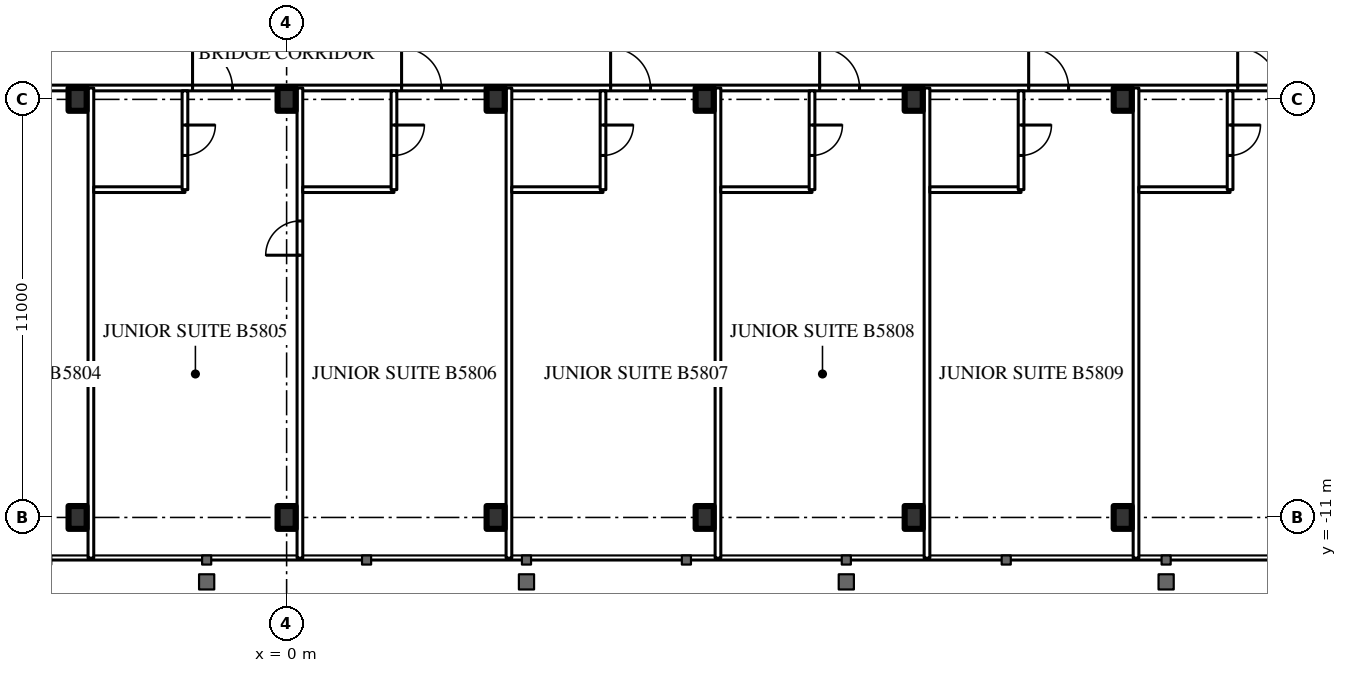
"""IFC4 building model, lengths in metres.
Left out: names, types, materials, properties, quantities, classifications, styles, units other than length and angle.
Written with IfcOpenShell. Run it as: python <this file> out.ifc"""

import sys

from ifc_helpers import new_model, si_unit, direction, frame, frame_2d, origin, origin_2d, place, context, subcontext, project, spatial, rectangle, i_section, extrude, element, fill, save


model = new_model("IFC4")
c1 = context("Model", 3, precision=1e-05, world=origin(), true_north=direction((0.0, 1.0)))
c2 = subcontext(c1, "Body", "Model", "MODEL_VIEW")
j1 = project(units=[si_unit("LENGTHUNIT", "METRE"), si_unit("PLANEANGLEUNIT", "RADIAN")], contexts=[c1])
p1 = place(None, origin())
s1 = spatial("IfcSite", under=j1, at=p1, CompositionType="ELEMENT")
p2 = place(p1, origin())
s2 = spatial("IfcBuilding", under=s1, at=p2, CompositionType="ELEMENT")
p3 = place(p2, frame((0.0, 0.0, 218.9)))
s3 = spatial("IfcBuildingStorey", under=s2, at=p3, CompositionType="ELEMENT", Elevation=218.9)
for number, where, z_axis, x_axis in (
    (1, (-5.5, -11.0, 0.0), (0.0, 0.0, 1.0), (1.0, 0.0, 0.0)),
    (2, (0.0, -11.0, 0.0), (0.0, 0.0, 1.0), (1.0, 0.0, 0.0)),
    (3, (5.5, -11.0, 0.0), (0.0, 0.0, 1.0), (1.0, 0.0, 0.0)),
    (4, (11.0, -11.0, 0.0), (0.0, 0.0, 1.0), (1.0, 0.0, 0.0)),
    (5, (16.5, -11.0, 0.0), (0.0, 0.0, 1.0), (1.0, 0.0, 0.0)),
    (6, (22.0, -11.0, 0.0), (0.0, 0.0, 1.0), (1.0, 0.0, 0.0)),
    (7, (-5.5, 0.0, 0.0), (0.0, 0.0, 1.0), (1.0, 0.0, 0.0)),
    (8, (0.0, 0.0, 0.0), (0.0, 0.0, 1.0), (1.0, 0.0, 0.0)),
    (9, (5.5, 0.0, 0.0), (0.0, 0.0, 1.0), (1.0, 0.0, 0.0)),
    (10, (11.0, 0.0, 0.0), (0.0, 0.0, 1.0), (1.0, 0.0, 0.0)),
    (11, (16.5, 0.0, 0.0), (0.0, 0.0, 1.0), (1.0, 0.0, 0.0)),
    (12, (22.0, 0.0, 0.0), (0.0, 0.0, 1.0), (1.0, 0.0, 0.0)),
):
    element("IfcColumn", number, at=place(p3, frame(where, z_axis=z_axis, x_axis=x_axis)), inside=s3, PredefinedType="COLUMN", context=c2, shape_type="SweptSolid", body=[
        extrude(i_section(OverallWidth=0.476, OverallDepth=0.6, WebThickness=0.1, FlangeThickness=0.14, FilletRadius=0.02, at=origin_2d()), origin(), (0.0, 0.0, 1.0), 3.6),
    ])
p4 = place(p3, frame((-27.5, 0.3, 0.0), z_axis=(0.0, 0.0, 1.0), x_axis=(1.0, 0.0, 0.0)))
e13 = element("IfcWall", 13, at=p4, inside=s3, PredefinedType="PARTITIONING", context=c2, shape_type="SweptSolid", body=[
    extrude(rectangle(XDim=55.0, YDim=0.15, at=frame_2d((27.5, 0.0))), origin(), (0.0, 0.0, 1.0), 2.4),
])
p5 = place(p4, frame((1.575, 0.0, 0.0)))
e14 = element("IfcOpeningElement", 14, at=p5, cuts=e13, PredefinedType="OPENING", context=c2, shape_type="SweptSolid", body=[
    extrude(rectangle(XDim=1.0, YDim=2.2, at=frame_2d((0.5, 1.1))), frame((0.0, 0.085, 0.0), z_axis=(0.0, -1.0, 0.0), x_axis=(1.0, 0.0, 0.0)), (0.0, 0.0, 1.0), 0.17),
])
p6 = place(p4, frame((8.525, 0.0, 0.0)))
e15 = element("IfcOpeningElement", 15, at=p6, cuts=e13, PredefinedType="OPENING", context=c2, shape_type="SweptSolid", body=[
    extrude(rectangle(XDim=1.05, YDim=2.4, at=frame_2d((0.525, 1.2))), frame((0.0, 0.085, 0.0), z_axis=(0.0, -1.0, 0.0), x_axis=(1.0, 0.0, 0.0)), (0.0, 0.0, 1.0), 0.17),
])
p7 = place(p4, frame((14.025, 0.0, 0.0)))
e16 = element("IfcOpeningElement", 16, at=p7, cuts=e13, PredefinedType="OPENING", context=c2, shape_type="SweptSolid", body=[
    extrude(rectangle(XDim=1.05, YDim=2.4, at=frame_2d((0.525, 1.2))), frame((0.0, 0.085, 0.0), z_axis=(0.0, -1.0, 0.0), x_axis=(1.0, 0.0, 0.0)), (0.0, 0.0, 1.0), 0.17),
])
p8 = place(p4, frame((19.525, 0.0, 0.0)))
e17 = element("IfcOpeningElement", 17, at=p8, cuts=e13, PredefinedType="OPENING", context=c2, shape_type="SweptSolid", body=[
    extrude(rectangle(XDim=1.05, YDim=2.4, at=frame_2d((0.525, 1.2))), frame((0.0, 0.085, 0.0), z_axis=(0.0, -1.0, 0.0), x_axis=(1.0, 0.0, 0.0)), (0.0, 0.0, 1.0), 0.17),
])
p9 = place(p4, frame((25.025, 0.0, 0.0)))
e18 = element("IfcOpeningElement", 18, at=p9, cuts=e13, PredefinedType="OPENING", context=c2, shape_type="SweptSolid", body=[
    extrude(rectangle(XDim=1.05, YDim=2.4, at=frame_2d((0.525, 1.2))), frame((0.0, 0.085, 0.0), z_axis=(0.0, -1.0, 0.0), x_axis=(1.0, 0.0, 0.0)), (0.0, 0.0, 1.0), 0.17),
])
p10 = place(p4, frame((30.525, 0.0, 0.0)))
e19 = element("IfcOpeningElement", 19, at=p10, cuts=e13, PredefinedType="OPENING", context=c2, shape_type="SweptSolid", body=[
    extrude(rectangle(XDim=1.05, YDim=2.4, at=frame_2d((0.525, 1.2))), frame((0.0, 0.085, 0.0), z_axis=(0.0, -1.0, 0.0), x_axis=(1.0, 0.0, 0.0)), (0.0, 0.0, 1.0), 0.17),
])
p11 = place(p4, frame((36.025, 0.0, 0.0)))
e20 = element("IfcOpeningElement", 20, at=p11, cuts=e13, PredefinedType="OPENING", context=c2, shape_type="SweptSolid", body=[
    extrude(rectangle(XDim=1.05, YDim=2.4, at=frame_2d((0.525, 1.2))), frame((0.0, 0.085, 0.0), z_axis=(0.0, -1.0, 0.0), x_axis=(1.0, 0.0, 0.0)), (0.0, 0.0, 1.0), 0.17),
])
p12 = place(p4, frame((41.525, 0.0, 0.0)))
e21 = element("IfcOpeningElement", 21, at=p12, cuts=e13, PredefinedType="OPENING", context=c2, shape_type="SweptSolid", body=[
    extrude(rectangle(XDim=1.05, YDim=2.4, at=frame_2d((0.525, 1.2))), frame((0.0, 0.085, 0.0), z_axis=(0.0, -1.0, 0.0), x_axis=(1.0, 0.0, 0.0)), (0.0, 0.0, 1.0), 0.17),
])
p13 = place(p4, frame((47.025, 0.0, 0.0)))
e22 = element("IfcOpeningElement", 22, at=p13, cuts=e13, PredefinedType="OPENING", context=c2, shape_type="SweptSolid", body=[
    extrude(rectangle(XDim=1.05, YDim=2.4, at=frame_2d((0.525, 1.2))), frame((0.0, 0.085, 0.0), z_axis=(0.0, -1.0, 0.0), x_axis=(1.0, 0.0, 0.0)), (0.0, 0.0, 1.0), 0.17),
])
p14 = place(p4, frame((52.525, 0.0, 0.0)))
e23 = element("IfcOpeningElement", 23, at=p14, cuts=e13, PredefinedType="OPENING", context=c2, shape_type="SweptSolid", body=[
    extrude(rectangle(XDim=1.05, YDim=2.4, at=frame_2d((0.525, 1.2))), frame((0.0, 0.085, 0.0), z_axis=(0.0, -1.0, 0.0), x_axis=(1.0, 0.0, 0.0)), (0.0, 0.0, 1.0), 0.17),
])
p15 = place(p3, frame((-5.15, -12.07, 0.0), z_axis=(0.0, 0.0, 1.0), x_axis=(0.0, 1.0, 0.0)))
e24 = element("IfcWall", 24, at=p15, inside=s3, PredefinedType="PARTITIONING", context=c2, shape_type="SweptSolid", body=[
    extrude(rectangle(XDim=12.37, YDim=0.15, at=frame_2d((6.185, 0.0))), origin(), (0.0, 0.0, 1.0), 3.4),
])
p16 = place(p3, frame((0.35, -12.07, 0.0), z_axis=(0.0, 0.0, 1.0), x_axis=(0.0, 1.0, 0.0)))
e25 = element("IfcWall", 25, at=p16, inside=s3, PredefinedType="PARTITIONING", context=c2, shape_type="SweptSolid", body=[
    extrude(rectangle(XDim=12.37, YDim=0.15, at=frame_2d((6.185, 0.0))), origin(), (0.0, 0.0, 1.0), 3.4),
])
p17 = place(p16, frame((7.97, 0.0, 0.0)))
e26 = element("IfcOpeningElement", 26, at=p17, cuts=e25, PredefinedType="OPENING", context=c2, shape_type="SweptSolid", body=[
    extrude(rectangle(XDim=0.9, YDim=2.2, at=frame_2d((0.45, 1.1))), frame((0.0, 0.085, 0.0), z_axis=(0.0, -1.0, 0.0), x_axis=(1.0, 0.0, 0.0)), (0.0, 0.0, 1.0), 0.17),
])
for number, where, z_axis, x_axis in (
    (27, (5.85, -12.07, 0.0), (0.0, 0.0, 1.0), (0.0, 1.0, 0.0)),
    (28, (11.35, -12.07, 0.0), (0.0, 0.0, 1.0), (0.0, 1.0, 0.0)),
    (29, (16.85, -12.07, 0.0), (0.0, 0.0, 1.0), (0.0, 1.0, 0.0)),
    (30, (22.35, -12.07, 0.0), (0.0, 0.0, 1.0), (0.0, 1.0, 0.0)),
):
    element("IfcWall", number, at=place(p3, frame(where, z_axis=z_axis, x_axis=x_axis)), inside=s3, PredefinedType="PARTITIONING", context=c2, shape_type="SweptSolid", body=[
        extrude(rectangle(XDim=12.37, YDim=0.15, at=frame_2d((6.185, 0.0))), origin(), (0.0, 0.0, 1.0), 3.4),
    ])
p18 = place(p3, frame((-5.075, -2.375, 0.0), z_axis=(0.0, 0.0, 1.0), x_axis=(1.0, 0.0, 0.0)))
e31 = element("IfcWall", 31, at=p18, inside=s3, PredefinedType="PARTITIONING", context=c2, shape_type="SweptSolid", body=[
    extrude(rectangle(XDim=2.4, YDim=0.15, at=frame_2d((1.2, 0.0))), origin(), (0.0, 0.0, 1.0), 3.4),
])
p19 = place(p3, frame((-2.675, -2.375, 0.0), z_axis=(0.0, 0.0, 1.0), x_axis=(0.0, 1.0, 0.0)))
e32 = element("IfcWall", 32, at=p19, inside=s3, PredefinedType="PARTITIONING", context=c2, shape_type="SweptSolid", body=[
    extrude(rectangle(XDim=2.6, YDim=0.15, at=frame_2d((1.3, 0.0))), origin(), (0.0, 0.0, 1.0), 3.4),
])
p20 = place(p19, frame((0.9, 0.0, 0.0)))
e33 = element("IfcOpeningElement", 33, at=p20, cuts=e32, PredefinedType="OPENING", context=c2, shape_type="SweptSolid", body=[
    extrude(rectangle(XDim=0.8, YDim=2.2, at=frame_2d((0.4, 1.1))), frame((0.0, 0.085, 0.0), z_axis=(0.0, -1.0, 0.0), x_axis=(1.0, 0.0, 0.0)), (0.0, 0.0, 1.0), 0.17),
])
p21 = place(p3, frame((0.425, -2.375, 0.0), z_axis=(0.0, 0.0, 1.0), x_axis=(1.0, 0.0, 0.0)))
e34 = element("IfcWall", 34, at=p21, inside=s3, PredefinedType="PARTITIONING", context=c2, shape_type="SweptSolid", body=[
    extrude(rectangle(XDim=2.4, YDim=0.15, at=frame_2d((1.2, 0.0))), origin(), (0.0, 0.0, 1.0), 3.4),
])
p22 = place(p3, frame((2.825, -2.375, 0.0), z_axis=(0.0, 0.0, 1.0), x_axis=(0.0, 1.0, 0.0)))
e35 = element("IfcWall", 35, at=p22, inside=s3, PredefinedType="PARTITIONING", context=c2, shape_type="SweptSolid", body=[
    extrude(rectangle(XDim=2.6, YDim=0.15, at=frame_2d((1.3, 0.0))), origin(), (0.0, 0.0, 1.0), 3.4),
])
p23 = place(p22, frame((0.9, 0.0, 0.0)))
e36 = element("IfcOpeningElement", 36, at=p23, cuts=e35, PredefinedType="OPENING", context=c2, shape_type="SweptSolid", body=[
    extrude(rectangle(XDim=0.8, YDim=2.2, at=frame_2d((0.4, 1.1))), frame((0.0, 0.085, 0.0), z_axis=(0.0, -1.0, 0.0), x_axis=(1.0, 0.0, 0.0)), (0.0, 0.0, 1.0), 0.17),
])
p24 = place(p3, frame((5.925, -2.375, 0.0), z_axis=(0.0, 0.0, 1.0), x_axis=(1.0, 0.0, 0.0)))
e37 = element("IfcWall", 37, at=p24, inside=s3, PredefinedType="PARTITIONING", context=c2, shape_type="SweptSolid", body=[
    extrude(rectangle(XDim=2.4, YDim=0.15, at=frame_2d((1.2, 0.0))), origin(), (0.0, 0.0, 1.0), 3.4),
])
p25 = place(p3, frame((8.325, -2.375, 0.0), z_axis=(0.0, 0.0, 1.0), x_axis=(0.0, 1.0, 0.0)))
e38 = element("IfcWall", 38, at=p25, inside=s3, PredefinedType="PARTITIONING", context=c2, shape_type="SweptSolid", body=[
    extrude(rectangle(XDim=2.6, YDim=0.15, at=frame_2d((1.3, 0.0))), origin(), (0.0, 0.0, 1.0), 3.4),
])
p26 = place(p25, frame((0.9, 0.0, 0.0)))
e39 = element("IfcOpeningElement", 39, at=p26, cuts=e38, PredefinedType="OPENING", context=c2, shape_type="SweptSolid", body=[
    extrude(rectangle(XDim=0.8, YDim=2.2, at=frame_2d((0.4, 1.1))), frame((0.0, 0.085, 0.0), z_axis=(0.0, -1.0, 0.0), x_axis=(1.0, 0.0, 0.0)), (0.0, 0.0, 1.0), 0.17),
])
p27 = place(p3, frame((11.425, -2.375, 0.0), z_axis=(0.0, 0.0, 1.0), x_axis=(1.0, 0.0, 0.0)))
e40 = element("IfcWall", 40, at=p27, inside=s3, PredefinedType="PARTITIONING", context=c2, shape_type="SweptSolid", body=[
    extrude(rectangle(XDim=2.4, YDim=0.15, at=frame_2d((1.2, 0.0))), origin(), (0.0, 0.0, 1.0), 3.4),
])
p28 = place(p3, frame((13.825, -2.375, 0.0), z_axis=(0.0, 0.0, 1.0), x_axis=(0.0, 1.0, 0.0)))
e41 = element("IfcWall", 41, at=p28, inside=s3, PredefinedType="PARTITIONING", context=c2, shape_type="SweptSolid", body=[
    extrude(rectangle(XDim=2.6, YDim=0.15, at=frame_2d((1.3, 0.0))), origin(), (0.0, 0.0, 1.0), 3.4),
])
p29 = place(p28, frame((0.9, 0.0, 0.0)))
e42 = element("IfcOpeningElement", 42, at=p29, cuts=e41, PredefinedType="OPENING", context=c2, shape_type="SweptSolid", body=[
    extrude(rectangle(XDim=0.8, YDim=2.2, at=frame_2d((0.4, 1.1))), frame((0.0, 0.085, 0.0), z_axis=(0.0, -1.0, 0.0), x_axis=(1.0, 0.0, 0.0)), (0.0, 0.0, 1.0), 0.17),
])
p30 = place(p3, frame((16.925, -2.375, 0.0), z_axis=(0.0, 0.0, 1.0), x_axis=(1.0, 0.0, 0.0)))
e43 = element("IfcWall", 43, at=p30, inside=s3, PredefinedType="PARTITIONING", context=c2, shape_type="SweptSolid", body=[
    extrude(rectangle(XDim=2.4, YDim=0.15, at=frame_2d((1.2, 0.0))), origin(), (0.0, 0.0, 1.0), 3.4),
])
p31 = place(p3, frame((19.325, -2.375, 0.0), z_axis=(0.0, 0.0, 1.0), x_axis=(0.0, 1.0, 0.0)))
e44 = element("IfcWall", 44, at=p31, inside=s3, PredefinedType="PARTITIONING", context=c2, shape_type="SweptSolid", body=[
    extrude(rectangle(XDim=2.6, YDim=0.15, at=frame_2d((1.3, 0.0))), origin(), (0.0, 0.0, 1.0), 3.4),
])
p32 = place(p31, frame((0.9, 0.0, 0.0)))
e45 = element("IfcOpeningElement", 45, at=p32, cuts=e44, PredefinedType="OPENING", context=c2, shape_type="SweptSolid", body=[
    extrude(rectangle(XDim=0.8, YDim=2.2, at=frame_2d((0.4, 1.1))), frame((0.0, 0.085, 0.0), z_axis=(0.0, -1.0, 0.0), x_axis=(1.0, 0.0, 0.0)), (0.0, 0.0, 1.0), 0.17),
])
p33 = place(p3, frame((22.425, -2.375, 0.0), z_axis=(0.0, 0.0, 1.0), x_axis=(1.0, 0.0, 0.0)))
e46 = element("IfcWall", 46, at=p33, inside=s3, PredefinedType="PARTITIONING", context=c2, shape_type="SweptSolid", body=[
    extrude(rectangle(XDim=2.4, YDim=0.15, at=frame_2d((1.2, 0.0))), origin(), (0.0, 0.0, 1.0), 3.4),
])
p34 = place(p3, frame((24.825, -2.375, 0.0), z_axis=(0.0, 0.0, 1.0), x_axis=(0.0, 1.0, 0.0)))
e47 = element("IfcWall", 47, at=p34, inside=s3, PredefinedType="PARTITIONING", context=c2, shape_type="SweptSolid", body=[
    extrude(rectangle(XDim=2.6, YDim=0.15, at=frame_2d((1.3, 0.0))), origin(), (0.0, 0.0, 1.0), 3.4),
])
p35 = place(p34, frame((0.9, 0.0, 0.0)))
e48 = element("IfcOpeningElement", 48, at=p35, cuts=e47, PredefinedType="OPENING", context=c2, shape_type="SweptSolid", body=[
    extrude(rectangle(XDim=0.8, YDim=2.2, at=frame_2d((0.4, 1.1))), frame((0.0, 0.085, 0.0), z_axis=(0.0, -1.0, 0.0), x_axis=(1.0, 0.0, 0.0)), (0.0, 0.0, 1.0), 0.17),
])
p36 = place(p20, origin())
e49 = element("IfcDoor", 49, at=p36, inside=s3, OperationType="SINGLE_SWING_RIGHT", PredefinedType="DOOR", context=c2, shape_type="SweptSolid", body=[
    extrude(rectangle(XDim=0.8, YDim=2.2, at=frame_2d((0.4, 1.1))), frame((0.0, 0.025, 0.0), z_axis=(0.0, -1.0, 0.0), x_axis=(1.0, 0.0, 0.0)), (0.0, 0.0, 1.0), 0.05),
])
fill(e33, e49)
p37 = place(p9, origin())
e50 = element("IfcDoor", 50, at=p37, inside=s3, OperationType="SINGLE_SWING_LEFT", PredefinedType="DOOR", context=c2, shape_type="SweptSolid", body=[
    extrude(rectangle(XDim=1.05, YDim=2.4, at=frame_2d((0.525, 1.2))), frame((0.0, 0.025, 0.0), z_axis=(0.0, -1.0, 0.0), x_axis=(1.0, 0.0, 0.0)), (0.0, 0.0, 1.0), 0.05),
])
fill(e18, e50)
p38 = place(p23, origin())
e51 = element("IfcDoor", 51, at=p38, inside=s3, OperationType="SINGLE_SWING_RIGHT", PredefinedType="DOOR", context=c2, shape_type="SweptSolid", body=[
    extrude(rectangle(XDim=0.8, YDim=2.2, at=frame_2d((0.4, 1.1))), frame((0.0, 0.025, 0.0), z_axis=(0.0, -1.0, 0.0), x_axis=(1.0, 0.0, 0.0)), (0.0, 0.0, 1.0), 0.05),
])
fill(e36, e51)
p39 = place(p10, origin())
e52 = element("IfcDoor", 52, at=p39, inside=s3, OperationType="SINGLE_SWING_LEFT", PredefinedType="DOOR", context=c2, shape_type="SweptSolid", body=[
    extrude(rectangle(XDim=1.05, YDim=2.4, at=frame_2d((0.525, 1.2))), frame((0.0, 0.025, 0.0), z_axis=(0.0, -1.0, 0.0), x_axis=(1.0, 0.0, 0.0)), (0.0, 0.0, 1.0), 0.05),
])
fill(e19, e52)
p40 = place(p26, origin())
e53 = element("IfcDoor", 53, at=p40, inside=s3, OperationType="SINGLE_SWING_RIGHT", PredefinedType="DOOR", context=c2, shape_type="SweptSolid", body=[
    extrude(rectangle(XDim=0.8, YDim=2.2, at=frame_2d((0.4, 1.1))), frame((0.0, 0.025, 0.0), z_axis=(0.0, -1.0, 0.0), x_axis=(1.0, 0.0, 0.0)), (0.0, 0.0, 1.0), 0.05),
])
fill(e39, e53)
p41 = place(p11, origin())
e54 = element("IfcDoor", 54, at=p41, inside=s3, OperationType="SINGLE_SWING_LEFT", PredefinedType="DOOR", context=c2, shape_type="SweptSolid", body=[
    extrude(rectangle(XDim=1.05, YDim=2.4, at=frame_2d((0.525, 1.2))), frame((0.0, 0.025, 0.0), z_axis=(0.0, -1.0, 0.0), x_axis=(1.0, 0.0, 0.0)), (0.0, 0.0, 1.0), 0.05),
])
fill(e20, e54)
p42 = place(p29, origin())
e55 = element("IfcDoor", 55, at=p42, inside=s3, OperationType="SINGLE_SWING_RIGHT", PredefinedType="DOOR", context=c2, shape_type="SweptSolid", body=[
    extrude(rectangle(XDim=0.8, YDim=2.2, at=frame_2d((0.4, 1.1))), frame((0.0, 0.025, 0.0), z_axis=(0.0, -1.0, 0.0), x_axis=(1.0, 0.0, 0.0)), (0.0, 0.0, 1.0), 0.05),
])
fill(e42, e55)
p43 = place(p12, origin())
e56 = element("IfcDoor", 56, at=p43, inside=s3, OperationType="SINGLE_SWING_LEFT", PredefinedType="DOOR", context=c2, shape_type="SweptSolid", body=[
    extrude(rectangle(XDim=1.05, YDim=2.4, at=frame_2d((0.525, 1.2))), frame((0.0, 0.025, 0.0), z_axis=(0.0, -1.0, 0.0), x_axis=(1.0, 0.0, 0.0)), (0.0, 0.0, 1.0), 0.05),
])
fill(e21, e56)
p44 = place(p32, origin())
e57 = element("IfcDoor", 57, at=p44, inside=s3, OperationType="SINGLE_SWING_RIGHT", PredefinedType="DOOR", context=c2, shape_type="SweptSolid", body=[
    extrude(rectangle(XDim=0.8, YDim=2.2, at=frame_2d((0.4, 1.1))), frame((0.0, 0.025, 0.0), z_axis=(0.0, -1.0, 0.0), x_axis=(1.0, 0.0, 0.0)), (0.0, 0.0, 1.0), 0.05),
])
fill(e45, e57)
p45 = place(p13, origin())
e58 = element("IfcDoor", 58, at=p45, inside=s3, OperationType="SINGLE_SWING_LEFT", PredefinedType="DOOR", context=c2, shape_type="SweptSolid", body=[
    extrude(rectangle(XDim=1.05, YDim=2.4, at=frame_2d((0.525, 1.2))), frame((0.0, 0.025, 0.0), z_axis=(0.0, -1.0, 0.0), x_axis=(1.0, 0.0, 0.0)), (0.0, 0.0, 1.0), 0.05),
])
fill(e22, e58)
p46 = place(p35, origin())
e59 = element("IfcDoor", 59, at=p46, inside=s3, OperationType="SINGLE_SWING_RIGHT", PredefinedType="DOOR", context=c2, shape_type="SweptSolid", body=[
    extrude(rectangle(XDim=0.8, YDim=2.2, at=frame_2d((0.4, 1.1))), frame((0.0, 0.025, 0.0), z_axis=(0.0, -1.0, 0.0), x_axis=(1.0, 0.0, 0.0)), (0.0, 0.0, 1.0), 0.05),
])
fill(e48, e59)
p47 = place(p14, origin())
e60 = element("IfcDoor", 60, at=p47, inside=s3, OperationType="SINGLE_SWING_LEFT", PredefinedType="DOOR", context=c2, shape_type="SweptSolid", body=[
    extrude(rectangle(XDim=1.05, YDim=2.4, at=frame_2d((0.525, 1.2))), frame((0.0, 0.025, 0.0), z_axis=(0.0, -1.0, 0.0), x_axis=(1.0, 0.0, 0.0)), (0.0, 0.0, 1.0), 0.05),
])
fill(e23, e60)
p48 = place(p17, origin())
e61 = element("IfcDoor", 61, at=p48, inside=s3, OperationType="SINGLE_SWING_LEFT", PredefinedType="DOOR", context=c2, shape_type="SweptSolid", body=[
    extrude(rectangle(XDim=0.9, YDim=2.2, at=frame_2d((0.45, 1.1))), frame((0.0, 0.025, 0.0), z_axis=(0.0, -1.0, 0.0), x_axis=(1.0, 0.0, 0.0)), (0.0, 0.0, 1.0), 0.05),
])
fill(e26, e61)
save(model, sys.argv[1])
